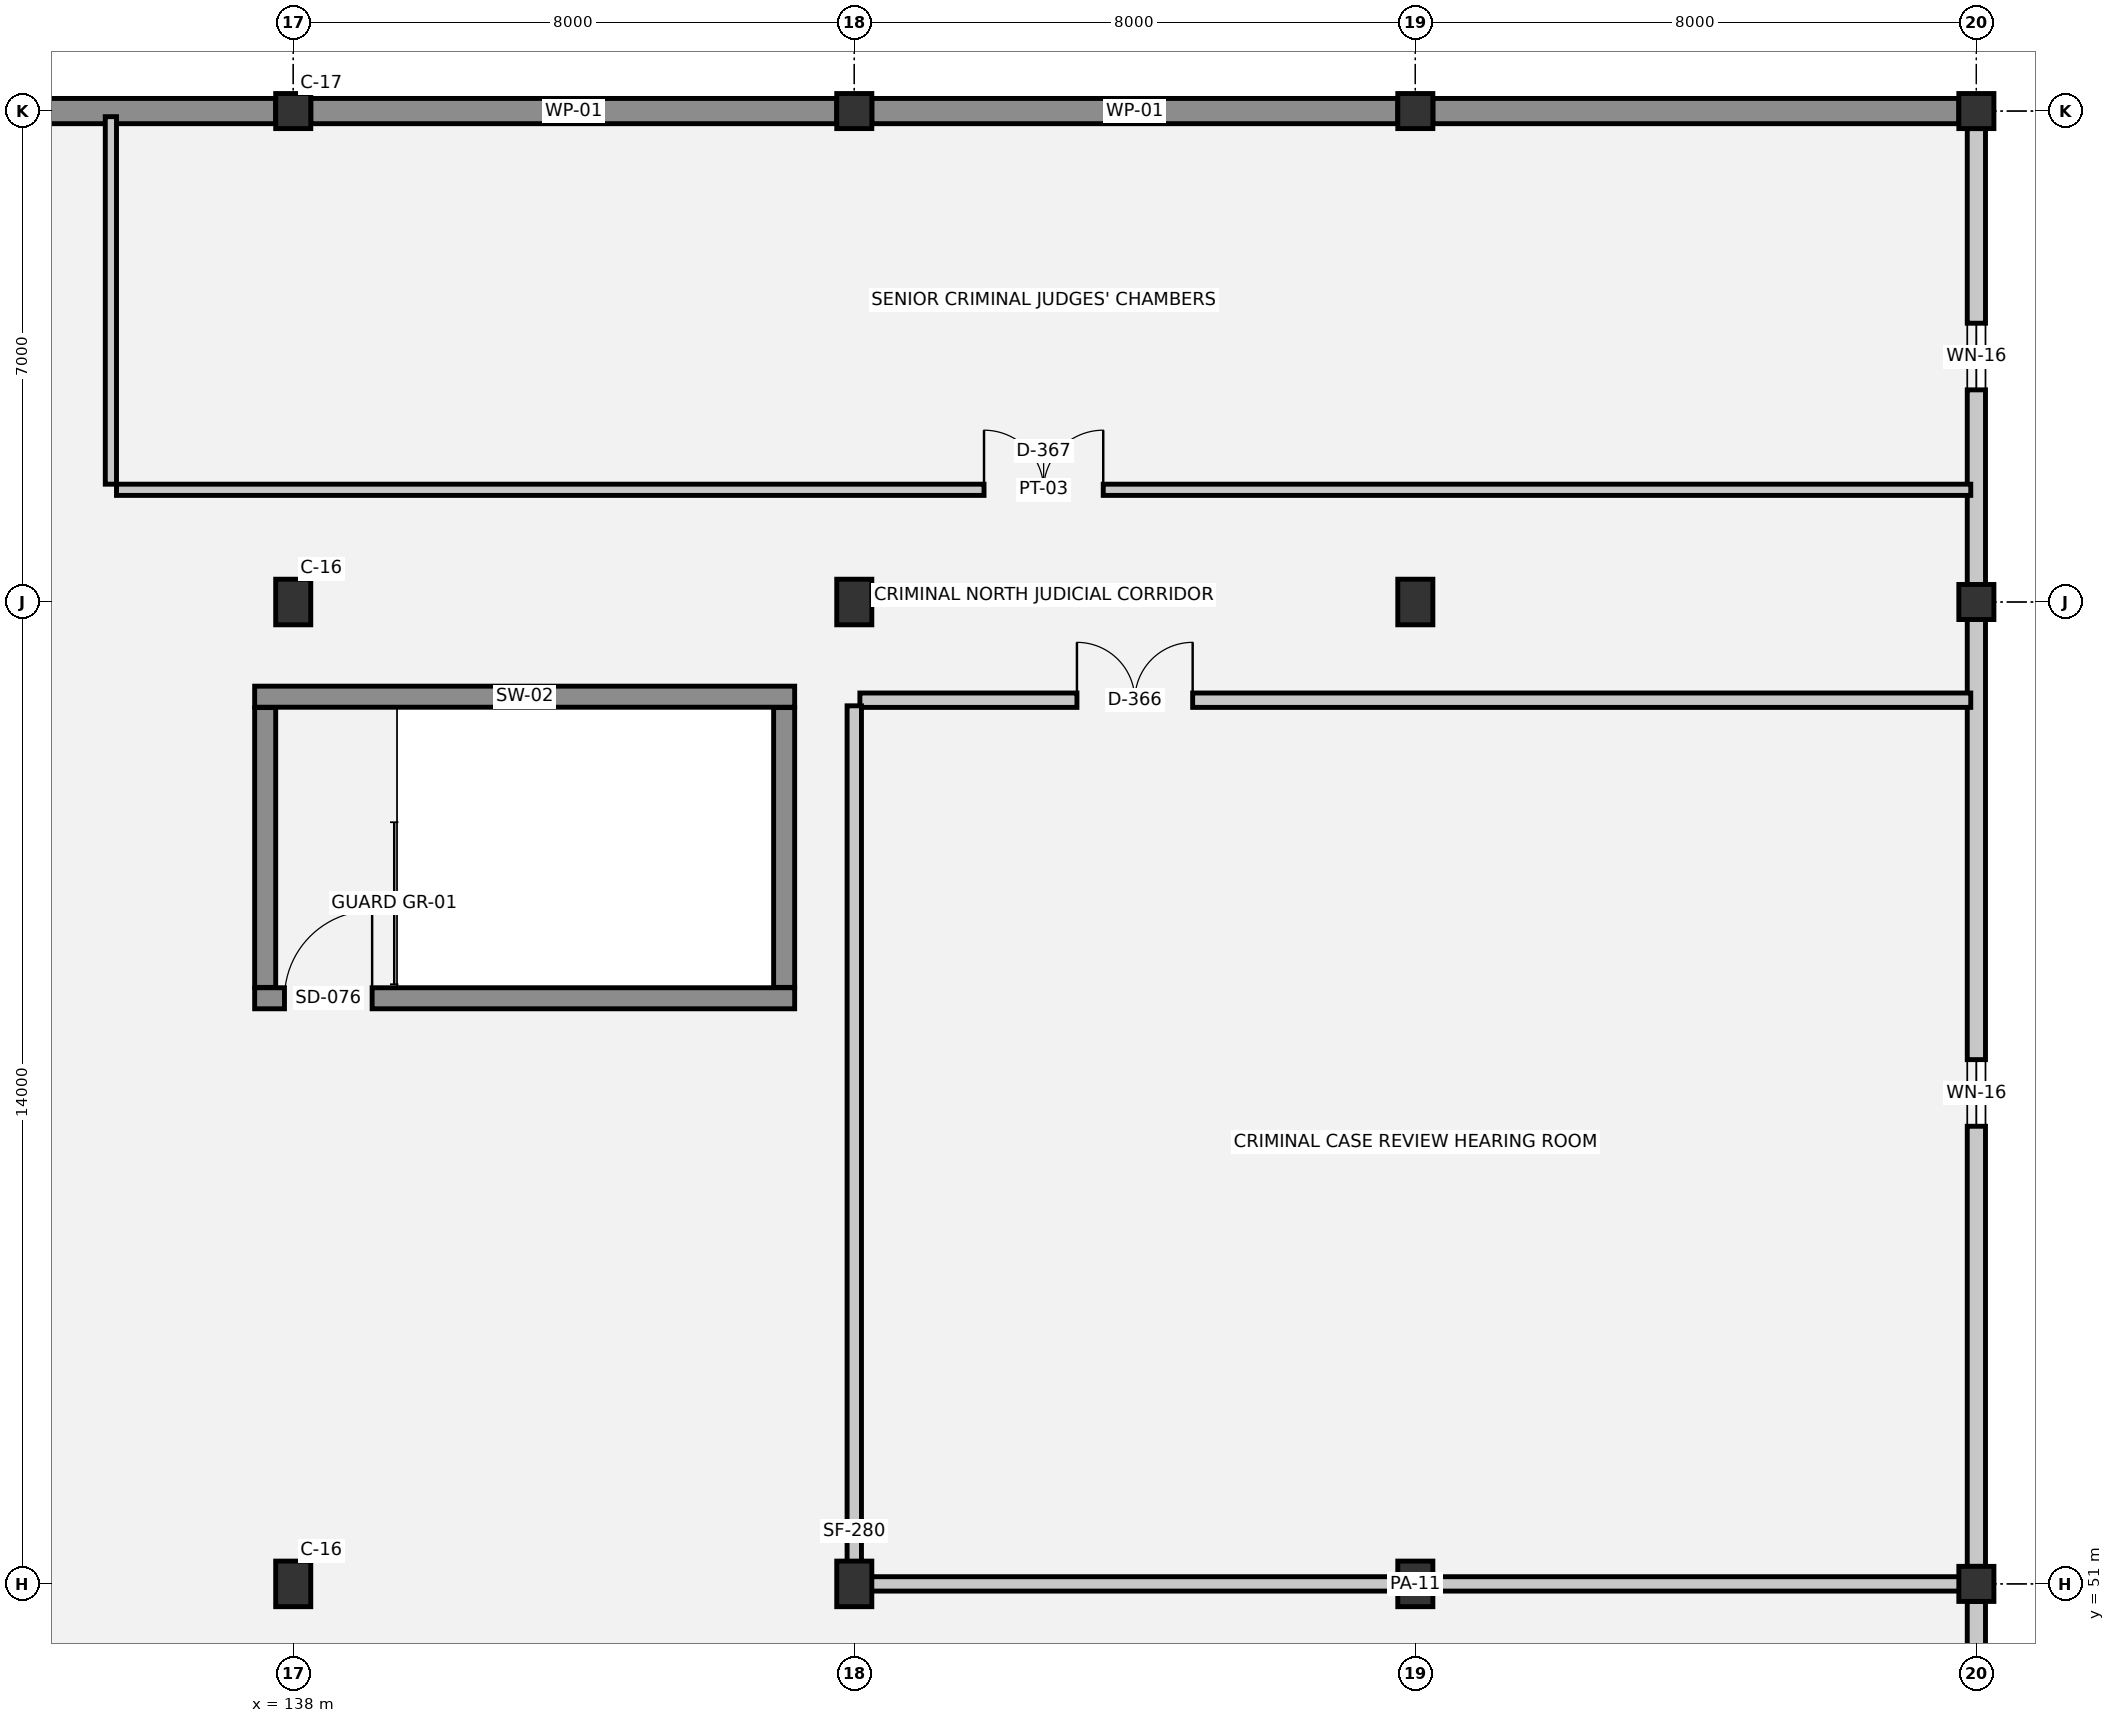
"""IFC4 building model, lengths in metres.
Left out: names, types, materials, properties, quantities, classifications, styles, units other than length and angle.
Written with IfcOpenShell. Run it as: python <this file> out.ifc"""

import sys

from ifc_helpers import new_model, si_unit, direction, frame, frame_2d, origin, origin_2d, place, context, subcontext, project, spatial, rectangle, extrude, element, fill, save


model = new_model("IFC4")
c1 = context("Model", 3, precision=1e-05, world=origin(), true_north=direction((0.0, 1.0)))
c2 = subcontext(c1, "Body", "Model", "MODEL_VIEW")
j1 = project(units=[si_unit("LENGTHUNIT", "METRE"), si_unit("PLANEANGLEUNIT", "RADIAN")], contexts=[c1])
p1 = place(None, origin())
s1 = spatial("IfcSite", under=j1, at=p1, CompositionType="ELEMENT")
p2 = place(p1, origin())
s2 = spatial("IfcBuilding", under=s1, at=p2, CompositionType="ELEMENT")
p3 = place(p2, frame((0.0, 0.0, 29.55)))
s3 = spatial("IfcBuildingStorey", under=s2, at=p3, CompositionType="ELEMENT", Elevation=29.55)
for number, where, z_axis, x_axis in (
    (1, (138.0, 51.0, 0.0), (0.0, 0.0, 1.0), (1.0, 0.0, 0.0)),
    (2, (138.0, 65.0, 0.0), (0.0, 0.0, 1.0), (1.0, 0.0, 0.0)),
):
    element("IfcColumn", number, at=place(p3, frame(where, z_axis=z_axis, x_axis=x_axis)), inside=s3, PredefinedType="COLUMN", context=c2, shape_type="SweptSolid", body=[
        extrude(rectangle(XDim=0.5, YDim=0.65, at=origin_2d()), origin(), (0.0, 0.0, 1.0), 3.75),
    ])
p4 = place(p3, frame((138.0, 72.0, 0.0), z_axis=(0.0, 0.0, 1.0), x_axis=(1.0, 0.0, 0.0)))
e3 = element("IfcColumn", 3, at=p4, inside=s3, PredefinedType="COLUMN", context=c2, shape_type="SweptSolid", body=[
    extrude(rectangle(XDim=0.5, YDim=0.5, at=origin_2d()), origin(), (0.0, 0.0, 1.0), 3.75),
])
for number, where, z_axis, x_axis in (
    (4, (146.0, 51.0, 0.0), (0.0, 0.0, 1.0), (1.0, 0.0, 0.0)),
    (5, (146.0, 65.0, 0.0), (0.0, 0.0, 1.0), (1.0, 0.0, 0.0)),
):
    element("IfcColumn", number, at=place(p3, frame(where, z_axis=z_axis, x_axis=x_axis)), inside=s3, PredefinedType="COLUMN", context=c2, shape_type="SweptSolid", body=[
        extrude(rectangle(XDim=0.5, YDim=0.65, at=origin_2d()), origin(), (0.0, 0.0, 1.0), 3.75),
    ])
p5 = place(p3, frame((146.0, 72.0, 0.0), z_axis=(0.0, 0.0, 1.0), x_axis=(1.0, 0.0, 0.0)))
e6 = element("IfcColumn", 6, at=p5, inside=s3, PredefinedType="COLUMN", context=c2, shape_type="SweptSolid", body=[
    extrude(rectangle(XDim=0.5, YDim=0.5, at=origin_2d()), origin(), (0.0, 0.0, 1.0), 3.75),
])
for number, where, z_axis, x_axis in (
    (7, (154.0, 51.0, 0.0), (0.0, 0.0, 1.0), (1.0, 0.0, 0.0)),
    (8, (154.0, 65.0, 0.0), (0.0, 0.0, 1.0), (1.0, 0.0, 0.0)),
):
    element("IfcColumn", number, at=place(p3, frame(where, z_axis=z_axis, x_axis=x_axis)), inside=s3, PredefinedType="COLUMN", context=c2, shape_type="SweptSolid", body=[
        extrude(rectangle(XDim=0.5, YDim=0.65, at=origin_2d()), origin(), (0.0, 0.0, 1.0), 3.75),
    ])
for number, where, z_axis, x_axis in (
    (9, (154.0, 72.0, 0.0), (0.0, 0.0, 1.0), (1.0, 0.0, 0.0)),
    (10, (162.0, 51.0, 0.0), (0.0, 0.0, 1.0), (1.0, 0.0, 0.0)),
    (11, (162.0, 65.0, 0.0), (0.0, 0.0, 1.0), (1.0, 0.0, 0.0)),
    (12, (162.0, 72.0, 0.0), (0.0, 0.0, 1.0), (1.0, 0.0, 0.0)),
):
    element("IfcColumn", number, at=place(p3, frame(where, z_axis=z_axis, x_axis=x_axis)), inside=s3, PredefinedType="COLUMN", context=c2, shape_type="SweptSolid", body=[
        extrude(rectangle(XDim=0.5, YDim=0.5, at=origin_2d()), origin(), (0.0, 0.0, 1.0), 3.75),
    ])
for number, where, z_axis, x_axis in (
    (13, (130.25, 72.0, 0.0), (0.0, 0.0, 1.0), (1.0, 0.0, 0.0)),
    (14, (138.25, 72.0, 0.0), (0.0, 0.0, 1.0), (1.0, 0.0, 0.0)),
    (15, (146.25, 72.0, 0.0), (0.0, 0.0, 1.0), (1.0, 0.0, 0.0)),
    (16, (154.25, 72.0, 0.0), (0.0, 0.0, 1.0), (1.0, 0.0, 0.0)),
):
    element("IfcWall", number, at=place(p3, frame(where, z_axis=z_axis, x_axis=x_axis)), inside=s3, PredefinedType="SOLIDWALL", context=c2, shape_type="SweptSolid", body=[
        extrude(rectangle(XDim=7.5, YDim=0.36, at=frame_2d((3.75, 0.0))), origin(), (0.0, 0.0, 1.0), 3.47),
    ])
p6 = place(p3, frame((162.0, 71.75, 0.0), z_axis=(0.0, 0.0, 1.0), x_axis=(0.0, -1.0, 0.0)))
e17 = element("IfcWall", 17, at=p6, inside=s3, PredefinedType="SOLIDWALL", context=c2, shape_type="SweptSolid", body=[
    extrude(rectangle(XDim=6.5, YDim=0.26, at=frame_2d((3.25, 0.0))), origin(), (0.0, 0.0, 1.0), 2.51),
])
p7 = place(p6, frame((2.775, 0.0, 1.0)))
e18 = element("IfcOpeningElement", 18, at=p7, cuts=e17, PredefinedType="OPENING", context=c2, shape_type="SweptSolid", body=[
    extrude(rectangle(XDim=0.95, YDim=1.1, at=frame_2d((0.475, 0.55))), frame((0.0, 0.14, 0.0), z_axis=(0.0, -1.0, 0.0), x_axis=(1.0, 0.0, 0.0)), (0.0, 0.0, 1.0), 0.28),
])
p8 = place(p3, frame((162.0, 64.75, 0.0), z_axis=(0.0, 0.0, 1.0), x_axis=(0.0, -1.0, 0.0)))
e19 = element("IfcWall", 19, at=p8, inside=s3, PredefinedType="SOLIDWALL", context=c2, shape_type="SweptSolid", body=[
    extrude(rectangle(XDim=13.5, YDim=0.26, at=frame_2d((6.75, 0.0))), origin(), (0.0, 0.0, 1.0), 2.51),
])
p9 = place(p8, frame((6.275, 0.0, 1.0)))
e20 = element("IfcOpeningElement", 20, at=p9, cuts=e19, PredefinedType="OPENING", context=c2, shape_type="SweptSolid", body=[
    extrude(rectangle(XDim=0.95, YDim=1.1, at=frame_2d((0.475, 0.55))), frame((0.0, 0.14, 0.0), z_axis=(0.0, -1.0, 0.0), x_axis=(1.0, 0.0, 0.0)), (0.0, 0.0, 1.0), 0.28),
])
p10 = place(p3, frame((162.0, 50.75, 0.0), z_axis=(0.0, 0.0, 1.0), x_axis=(0.0, -1.0, 0.0)))
e21 = element("IfcWall", 21, at=p10, inside=s3, PredefinedType="SOLIDWALL", context=c2, shape_type="SweptSolid", body=[
    extrude(rectangle(XDim=6.5, YDim=0.26, at=frame_2d((3.25, 0.0))), origin(), (0.0, 0.0, 1.0), 2.51),
])
p11 = place(p10, frame((2.775, 0.0, 1.0)))
e22 = element("IfcOpeningElement", 22, at=p11, cuts=e21, PredefinedType="OPENING", context=c2, shape_type="SweptSolid", body=[
    extrude(rectangle(XDim=0.95, YDim=1.1, at=frame_2d((0.475, 0.55))), frame((0.0, 0.14, 0.0), z_axis=(0.0, -1.0, 0.0), x_axis=(1.0, 0.0, 0.0)), (0.0, 0.0, 1.0), 0.28),
])
p12 = place(p3, frame((145.15, 63.65, 0.0), z_axis=(0.0, 0.0, 1.0), x_axis=(-1.0, 0.0, 0.0)))
e23 = element("IfcWall", 23, at=p12, inside=s3, PredefinedType="SHEAR", context=c2, shape_type="SweptSolid", body=[
    extrude(rectangle(XDim=7.7, YDim=0.3, at=frame_2d((3.85, 0.0))), origin(), (0.0, 0.0, 1.0), 3.47),
])
p13 = place(p3, frame((137.45, 59.35, 0.0), z_axis=(0.0, 0.0, 1.0), x_axis=(1.0, 0.0, 0.0)))
e24 = element("IfcWall", 24, at=p13, inside=s3, PredefinedType="SHEAR", context=c2, shape_type="SweptSolid", body=[
    extrude(rectangle(XDim=7.7, YDim=0.3, at=frame_2d((3.85, 0.0))), origin(), (0.0, 0.0, 1.0), 3.47),
])
p14 = place(p13, frame((0.425, 0.0, 0.0)))
e25 = element("IfcOpeningElement", 25, at=p14, cuts=e24, PredefinedType="OPENING", context=c2, shape_type="SweptSolid", body=[
    extrude(rectangle(XDim=1.25, YDim=2.15, at=frame_2d((0.625, 1.075))), frame((0.0, 0.16, 0.0), z_axis=(0.0, -1.0, 0.0), x_axis=(1.0, 0.0, 0.0)), (0.0, 0.0, 1.0), 0.32),
])
for number, where, z_axis, x_axis in (
    (26, (137.6, 63.495, 0.0), (0.0, 0.0, 1.0), (0.0, -1.0, 0.0)),
    (27, (145.0, 59.505, 0.0), (0.0, 0.0, 1.0), (0.0, 1.0, 0.0)),
):
    element("IfcWall", number, at=place(p3, frame(where, z_axis=z_axis, x_axis=x_axis)), inside=s3, PredefinedType="SHEAR", context=c2, shape_type="SweptSolid", body=[
        extrude(rectangle(XDim=3.99, YDim=0.3, at=frame_2d((1.995, 0.0))), origin(), (0.0, 0.0, 1.0), 3.47),
    ])
p15 = place(p3, frame((146.08, 51.0, 0.0), z_axis=(0.0, 0.0, 1.0), x_axis=(1.0, 0.0, 0.0)))
e28 = element("IfcWall", 28, at=p15, inside=s3, PredefinedType="PARTITIONING", context=c2, shape_type="SweptSolid", body=[
    extrude(rectangle(XDim=15.84, YDim=0.205, at=frame_2d((7.92, 0.0))), origin(), (0.0, 0.0, 1.0), 2.78),
])
p16 = place(p3, frame((146.08, 63.6, 0.0), z_axis=(0.0, 0.0, 1.0), x_axis=(1.0, 0.0, 0.0)))
e29 = element("IfcWall", 29, at=p16, inside=s3, PredefinedType="PARTITIONING", context=c2, shape_type="SweptSolid", body=[
    extrude(rectangle(XDim=15.84, YDim=0.205, at=frame_2d((7.92, 0.0))), origin(), (0.0, 0.0, 1.0), 3.39),
])
p17 = place(p16, frame((3.095, 0.0, 0.0)))
e30 = element("IfcOpeningElement", 30, at=p17, cuts=e29, PredefinedType="OPENING", context=c2, shape_type="SweptSolid", body=[
    extrude(rectangle(XDim=1.65, YDim=2.3, at=frame_2d((0.825, 1.15))), frame((0.0, 0.113, 0.0), z_axis=(0.0, -1.0, 0.0), x_axis=(1.0, 0.0, 0.0)), (0.0, 0.0, 1.0), 0.225),
])
p18 = place(p3, frame((135.48, 66.6, 0.0), z_axis=(0.0, 0.0, 1.0), x_axis=(1.0, 0.0, 0.0)))
e31 = element("IfcWall", 31, at=p18, inside=s3, PredefinedType="PARTITIONING", context=c2, shape_type="SweptSolid", body=[
    extrude(rectangle(XDim=26.44, YDim=0.16, at=frame_2d((13.22, 0.0))), origin(), (0.0, 0.0, 1.0), 3.39),
])
p19 = place(p18, frame((12.37, 0.0, 0.0)))
e32 = element("IfcOpeningElement", 32, at=p19, cuts=e31, PredefinedType="OPENING", context=c2, shape_type="SweptSolid", body=[
    extrude(rectangle(XDim=1.7, YDim=2.3, at=frame_2d((0.85, 1.15))), frame((0.0, 0.09, 0.0), z_axis=(0.0, -1.0, 0.0), x_axis=(1.0, 0.0, 0.0)), (0.0, 0.0, 1.0), 0.18),
])
p20 = place(p3, frame((135.4, 66.68, 0.0), z_axis=(0.0, 0.0, 1.0), x_axis=(0.0, 1.0, 0.0)))
e33 = element("IfcWall", 33, at=p20, inside=s3, PredefinedType="PARTITIONING", context=c2, shape_type="SweptSolid", body=[
    extrude(rectangle(XDim=5.24, YDim=0.16, at=frame_2d((2.62, 0.0))), origin(), (0.0, 0.0, 1.0), 3.39),
])
p21 = place(p3, frame((146.0, 51.08, 0.0), z_axis=(0.0, 0.0, 1.0), x_axis=(0.0, 1.0, 0.0)))
e34 = element("IfcWall", 34, at=p21, inside=s3, PredefinedType="PARTITIONING", context=c2, shape_type="SweptSolid", body=[
    extrude(rectangle(XDim=12.44, YDim=0.205, at=frame_2d((6.22, 0.0))), origin(), (0.0, 0.0, 1.0), 2.58),
])
p22 = place(p7, origin())
e35 = element("IfcWindow", 35, at=p22, inside=s3, PartitioningType="SINGLE_PANEL", PredefinedType="WINDOW", context=c2, shape_type="SweptSolid", body=[
    extrude(rectangle(XDim=0.95, YDim=1.1, at=frame_2d((0.475, 0.55))), frame((0.0, 0.03, 0.0), z_axis=(0.0, -1.0, 0.0), x_axis=(1.0, 0.0, 0.0)), (0.0, 0.0, 1.0), 0.06),
])
fill(e18, e35)
p23 = place(p9, origin())
e36 = element("IfcWindow", 36, at=p23, inside=s3, PartitioningType="SINGLE_PANEL", PredefinedType="WINDOW", context=c2, shape_type="SweptSolid", body=[
    extrude(rectangle(XDim=0.95, YDim=1.1, at=frame_2d((0.475, 0.55))), frame((0.0, 0.03, 0.0), z_axis=(0.0, -1.0, 0.0), x_axis=(1.0, 0.0, 0.0)), (0.0, 0.0, 1.0), 0.06),
])
fill(e20, e36)
p24 = place(p14, origin())
e37 = element("IfcDoor", 37, at=p24, inside=s3, OperationType="SINGLE_SWING_RIGHT", PredefinedType="DOOR", context=c2, shape_type="SweptSolid", body=[
    extrude(rectangle(XDim=1.25, YDim=2.15, at=frame_2d((0.625, 1.075))), frame((0.0, 0.025, 0.0), z_axis=(0.0, -1.0, 0.0), x_axis=(1.0, 0.0, 0.0)), (0.0, 0.0, 1.0), 0.05),
])
fill(e25, e37)
p25 = place(p17, origin())
e38 = element("IfcDoor", 38, at=p25, inside=s3, OperationType="DOUBLE_DOOR_SINGLE_SWING", PredefinedType="DOOR", context=c2, shape_type="SweptSolid", body=[
    extrude(rectangle(XDim=1.65, YDim=2.3, at=frame_2d((0.825, 1.15))), frame((0.0, 0.025, 0.0), z_axis=(0.0, -1.0, 0.0), x_axis=(1.0, 0.0, 0.0)), (0.0, 0.0, 1.0), 0.05),
])
fill(e30, e38)
p26 = place(p19, origin())
e39 = element("IfcDoor", 39, at=p26, inside=s3, OperationType="DOUBLE_DOOR_SINGLE_SWING", PredefinedType="DOOR", context=c2, shape_type="SweptSolid", body=[
    extrude(rectangle(XDim=1.7, YDim=2.3, at=frame_2d((0.85, 1.15))), frame((0.0, 0.025, 0.0), z_axis=(0.0, -1.0, 0.0), x_axis=(1.0, 0.0, 0.0)), (0.0, 0.0, 1.0), 0.05),
])
fill(e32, e39)
save(model, sys.argv[1])
